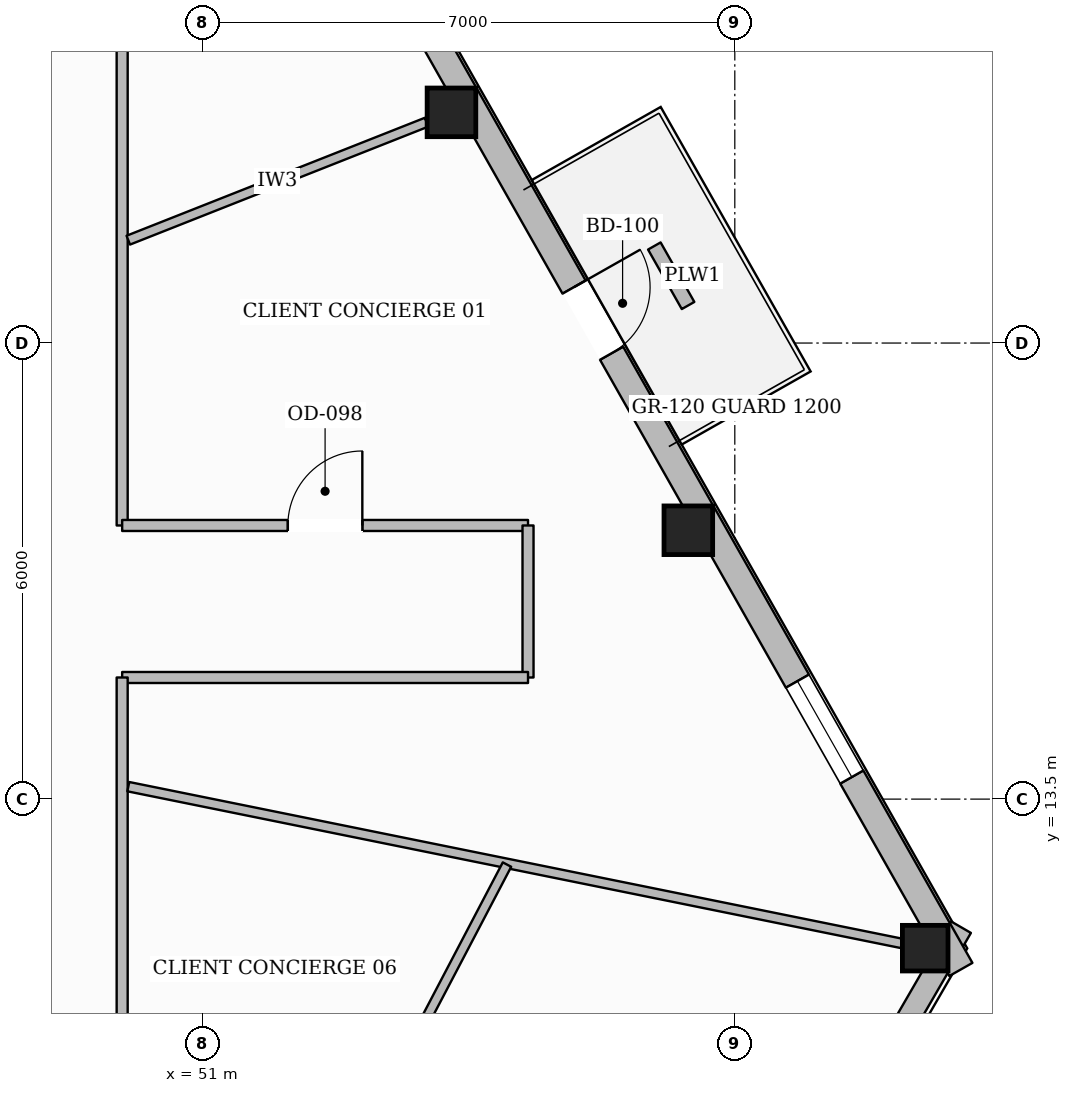
"""IFC4 building model, lengths in metres.
Left out: names, types, materials, properties, quantities, classifications, styles, units other than length and angle.
Written with IfcOpenShell. Run it as: python <this file> out.ifc"""

import sys

from ifc_helpers import new_model, si_unit, direction, frame, frame_2d, origin, origin_2d, place, context, subcontext, project, spatial, rectangle, hollow_rectangle, extrude, element, fill, save


model = new_model("IFC4")
c1 = context("Model", 3, precision=1e-05, world=origin(), true_north=direction((0.0, 1.0)))
c2 = subcontext(c1, "Body", "Model", "MODEL_VIEW")
j1 = project(units=[si_unit("LENGTHUNIT", "METRE"), si_unit("PLANEANGLEUNIT", "RADIAN")], contexts=[c1])
p1 = place(None, origin())
s1 = spatial("IfcSite", under=j1, at=p1, CompositionType="ELEMENT")
p2 = place(p1, origin())
s2 = spatial("IfcBuilding", under=s1, at=p2, CompositionType="ELEMENT")
p3 = place(p2, frame((0.0, 0.0, 222.75)))
s3 = spatial("IfcBuildingStorey", under=s2, at=p3, CompositionType="ELEMENT", Elevation=222.75)
p4 = place(p3, frame((60.505, 11.539, 0.0), z_axis=(0.0, 0.0, 1.0), x_axis=(1.0, 0.0, 0.0)))
e1 = element("IfcColumn", 1, at=p4, inside=s3, PredefinedType="COLUMN", context=c2, shape_type="SweptSolid", body=[
    extrude(hollow_rectangle(XDim=0.6, YDim=0.6, WallThickness=0.028, at=origin_2d()), origin(), (0.0, 0.0, 1.0), 3.6),
])
for number, where, z_axis, x_axis in (
    (2, (57.389, 17.037, 0.0), (0.0, 0.0, 1.0), (1.0, 0.0, 0.0)),
    (3, (54.272, 22.535, 0.0), (0.0, 0.0, 1.0), (1.0, 0.0, 0.0)),
):
    element("IfcColumn", number, at=place(p3, frame(where, z_axis=z_axis, x_axis=x_axis)), inside=s3, PredefinedType="COLUMN", context=c2, shape_type="SweptSolid", body=[
        extrude(hollow_rectangle(XDim=0.64, YDim=0.64, WallThickness=0.028, at=origin_2d()), origin(), (0.0, 0.0, 1.0), 3.6),
    ])
p5 = place(p3, frame((60.977, 11.815, 0.0), z_axis=(0.0, 0.0, 1.0), x_axis=(-0.501119216376, -0.865378258901, 0.0)))
e4 = element("IfcWall", 4, at=p5, inside=s3, PredefinedType="STANDARD", context=c2, shape_type="SweptSolid", body=[
    extrude(rectangle(XDim=8.818, YDim=0.3, at=frame_2d((4.409, 0.0))), origin(), (0.0, 0.0, 1.0), 3.132),
])
p6 = place(p5, frame((3.884, 0.0, 0.65)))
e5 = element("IfcOpeningElement", 5, at=p6, cuts=e4, PredefinedType="OPENING", context=c2, shape_type="SweptSolid", body=[
    extrude(rectangle(XDim=1.05, YDim=1.7, at=frame_2d((0.525, 0.85))), frame((0.0, 0.16, 0.0), z_axis=(0.0, -1.0, 0.0), x_axis=(1.0, 0.0, 0.0)), (0.0, 0.0, 1.0), 0.32),
])
p7 = place(p3, frame((41.804, 45.08, 0.0), z_axis=(0.0, 0.0, 1.0), x_axis=(0.493108750239, -0.869967677812, 0.0)))
e6 = element("IfcWall", 6, at=p7, inside=s3, PredefinedType="STANDARD", context=c2, shape_type="SweptSolid", body=[
    extrude(rectangle(XDim=38.876, YDim=0.35, at=frame_2d((19.438, 0.0))), origin(), (0.0, 0.0, 1.0), 3.132),
])
p8 = place(p7, frame((28.557, 0.0, 0.0)))
e7 = element("IfcOpeningElement", 7, at=p8, cuts=e6, PredefinedType="OPENING", context=c2, shape_type="SweptSolid", body=[
    extrude(rectangle(XDim=1.0, YDim=2.2, at=frame_2d((0.5, 1.1))), frame((0.0, 0.185, 0.0), z_axis=(0.0, -1.0, 0.0), x_axis=(1.0, 0.0, 0.0)), (0.0, 0.0, 1.0), 0.37),
])
p9 = place(p7, frame((34.516, 0.0, 0.65)))
e8 = element("IfcOpeningElement", 8, at=p9, cuts=e6, PredefinedType="OPENING", context=c2, shape_type="SweptSolid", body=[
    extrude(rectangle(XDim=1.45, YDim=1.75, at=frame_2d((0.725, 0.875))), frame((0.0, 0.185, 0.0), z_axis=(0.0, -1.0, 0.0), x_axis=(1.0, 0.0, 0.0)), (0.0, 0.0, 1.0), 0.37),
])
p10 = place(p7, frame((21.876, 0.0, 0.65)))
e9 = element("IfcOpeningElement", 9, at=p10, cuts=e6, PredefinedType="OPENING", context=c2, shape_type="SweptSolid", body=[
    extrude(rectangle(XDim=1.45, YDim=1.75, at=frame_2d((0.725, 0.875))), frame((0.0, 0.185, 0.0), z_axis=(0.0, -1.0, 0.0), x_axis=(1.0, 0.0, 0.0)), (0.0, 0.0, 1.0), 0.37),
])
p11 = place(p7, frame((9.237, 0.0, 0.65)))
e10 = element("IfcOpeningElement", 10, at=p11, cuts=e6, PredefinedType="OPENING", context=c2, shape_type="SweptSolid", body=[
    extrude(rectangle(XDim=1.45, YDim=1.75, at=frame_2d((0.725, 0.875))), frame((0.0, 0.185, 0.0), z_axis=(0.0, -1.0, 0.0), x_axis=(1.0, 0.0, 0.0)), (0.0, 0.0, 1.0), 0.37),
])
p12 = place(p7, frame((2.917, 0.0, 0.65)))
e11 = element("IfcOpeningElement", 11, at=p12, cuts=e6, PredefinedType="OPENING", context=c2, shape_type="SweptSolid", body=[
    extrude(rectangle(XDim=1.45, YDim=1.75, at=frame_2d((0.725, 0.875))), frame((0.0, 0.185, 0.0), z_axis=(0.0, -1.0, 0.0), x_axis=(1.0, 0.0, 0.0)), (0.0, 0.0, 1.0), 0.37),
])
p13 = place(p3, frame((57.385, 19.994, 0.0), z_axis=(0.0, 0.0, 1.0), x_axis=(-0.492950963654, 0.870057094352, 0.0)))
e12 = element("IfcWall", 12, at=p13, inside=s3, PredefinedType="USERDEFINED", context=c2, shape_type="SweptSolid", body=[
    extrude(rectangle(XDim=0.9, YDim=0.19, at=frame_2d((0.45, 0.0))), origin(), (0.0, 0.0, 1.0), 0.5),
])
p14 = place(p3, frame((49.94, 25.02, 0.0), z_axis=(0.0, 0.0, 1.0), x_axis=(0.0, -1.0, 0.0)))
e13 = element("IfcWall", 13, at=p14, inside=s3, PredefinedType="PARTITIONING", context=c2, shape_type="SweptSolid", body=[
    extrude(rectangle(XDim=7.92, YDim=0.145, at=frame_2d((3.96, 0.0))), origin(), (0.0, 0.0, 1.0), 3.339),
])
p15 = place(p3, frame((49.94, 17.1, 0.0), z_axis=(0.0, 0.0, 1.0), x_axis=(1.0, 0.0, 0.0)))
e14 = element("IfcWall", 14, at=p15, inside=s3, PredefinedType="PARTITIONING", context=c2, shape_type="SweptSolid", body=[
    extrude(rectangle(XDim=5.34, YDim=0.145, at=frame_2d((2.67, 0.0))), origin(), (0.0, 0.0, 1.0), 3.141),
])
p16 = place(p15, frame((2.18, 0.0, 0.0)))
e15 = element("IfcOpeningElement", 15, at=p16, cuts=e14, PredefinedType="OPENING", context=c2, shape_type="SweptSolid", body=[
    extrude(rectangle(XDim=0.98, YDim=2.15, at=frame_2d((0.49, 1.075))), frame((0.0, 0.083, 0.0), z_axis=(0.0, -1.0, 0.0), x_axis=(1.0, 0.0, 0.0)), (0.0, 0.0, 1.0), 0.165),
])
p17 = place(p3, frame((55.28, 17.1, 0.0), z_axis=(0.0, 0.0, 1.0), x_axis=(0.0, -1.0, 0.0)))
e16 = element("IfcWall", 16, at=p17, inside=s3, PredefinedType="PARTITIONING", context=c2, shape_type="SweptSolid", body=[
    extrude(rectangle(XDim=2.0, YDim=0.145, at=frame_2d((1.0, 0.0))), origin(), (0.0, 0.0, 1.0), 3.339),
])
p18 = place(p3, frame((55.28, 15.1, 0.0), z_axis=(0.0, 0.0, 1.0), x_axis=(-1.0, 0.0, 0.0)))
e17 = element("IfcWall", 17, at=p18, inside=s3, PredefinedType="PARTITIONING", context=c2, shape_type="SweptSolid", body=[
    extrude(rectangle(XDim=5.34, YDim=0.145, at=frame_2d((2.67, 0.0))), origin(), (0.0, 0.0, 1.0), 3.6),
])
p19 = place(p3, frame((49.94, 15.1, 0.0), z_axis=(0.0, 0.0, 1.0), x_axis=(0.0, -1.0, 0.0)))
e18 = element("IfcWall", 18, at=p19, inside=s3, PredefinedType="PARTITIONING", context=c2, shape_type="SweptSolid", body=[
    extrude(rectangle(XDim=7.92, YDim=0.145, at=frame_2d((3.96, 0.0))), origin(), (0.0, 0.0, 1.0), 3.6),
])
p20 = place(p3, frame((50.021, 20.854, 0.0), z_axis=(0.0, 0.0, 1.0), x_axis=(0.929922069696, 0.367756637319, 0.0)))
e19 = element("IfcWall", 19, at=p20, inside=s3, PredefinedType="PARTITIONING", context=c2, shape_type="SweptSolid", body=[
    extrude(rectangle(XDim=4.219, YDim=0.125, at=frame_2d((2.11, 0.0))), origin(), (0.0, 0.0, 1.0), 3.6),
])
p21 = place(p3, frame((50.021, 13.664, 0.0), z_axis=(0.0, 0.0, 1.0), x_axis=(0.980078307182, -0.198611459366, 0.0)))
e20 = element("IfcWall", 20, at=p21, inside=s3, PredefinedType="PARTITIONING", context=c2, shape_type="SweptSolid", body=[
    extrude(rectangle(XDim=10.383, YDim=0.125, at=frame_2d((5.192, 0.0))), origin(), (0.0, 0.0, 1.0), 3.141),
])
p22 = place(p3, frame((50.763, 4.556, 0.0), z_axis=(0.0, 0.0, 1.0), x_axis=(0.464483684419, 0.885581677153, 0.0)))
e21 = element("IfcWall", 21, at=p22, inside=s3, PredefinedType="PARTITIONING", context=c2, shape_type="SweptSolid", body=[
    extrude(rectangle(XDim=9.127, YDim=0.125, at=frame_2d((4.564, 0.0))), origin(), (0.0, 0.0, 1.0), 3.339),
])
p23 = place(p22, frame((3.966, 0.0, 0.0)))
e22 = element("IfcOpeningElement", 22, at=p23, cuts=e21, PredefinedType="OPENING", context=c2, shape_type="SweptSolid", body=[
    extrude(rectangle(XDim=0.98, YDim=2.15, at=frame_2d((0.49, 1.075))), frame((0.0, 0.073, 0.0), z_axis=(0.0, -1.0, 0.0), x_axis=(1.0, 0.0, 0.0)), (0.0, 0.0, 1.0), 0.145),
])
p24 = place(p8, origin())
e23 = element("IfcDoor", 23, at=p24, inside=s3, OperationType="SINGLE_SWING_LEFT", PredefinedType="DOOR", context=c2, shape_type="SweptSolid", body=[
    extrude(rectangle(XDim=1.0, YDim=2.2, at=frame_2d((0.5, 1.1))), frame((0.0, 0.025, 0.0), z_axis=(0.0, -1.0, 0.0), x_axis=(1.0, 0.0, 0.0)), (0.0, 0.0, 1.0), 0.05),
])
fill(e7, e23)
p25 = place(p9, origin())
e24 = element("IfcWindow", 24, at=p25, inside=s3, PartitioningType="SINGLE_PANEL", PredefinedType="WINDOW", context=c2, shape_type="SweptSolid", body=[
    extrude(rectangle(XDim=1.45, YDim=1.75, at=frame_2d((0.725, 0.875))), frame((0.0, 0.03, 0.0), z_axis=(0.0, -1.0, 0.0), x_axis=(1.0, 0.0, 0.0)), (0.0, 0.0, 1.0), 0.06),
])
fill(e8, e24)
p26 = place(p16, origin())
e25 = element("IfcDoor", 25, at=p26, inside=s3, OperationType="SINGLE_SWING_RIGHT", PredefinedType="DOOR", context=c2, shape_type="SweptSolid", body=[
    extrude(rectangle(XDim=0.98, YDim=2.15, at=frame_2d((0.49, 1.075))), frame((0.0, 0.025, 0.0), z_axis=(0.0, -1.0, 0.0), x_axis=(1.0, 0.0, 0.0)), (0.0, 0.0, 1.0), 0.05),
])
fill(e15, e25)
save(model, sys.argv[1])
